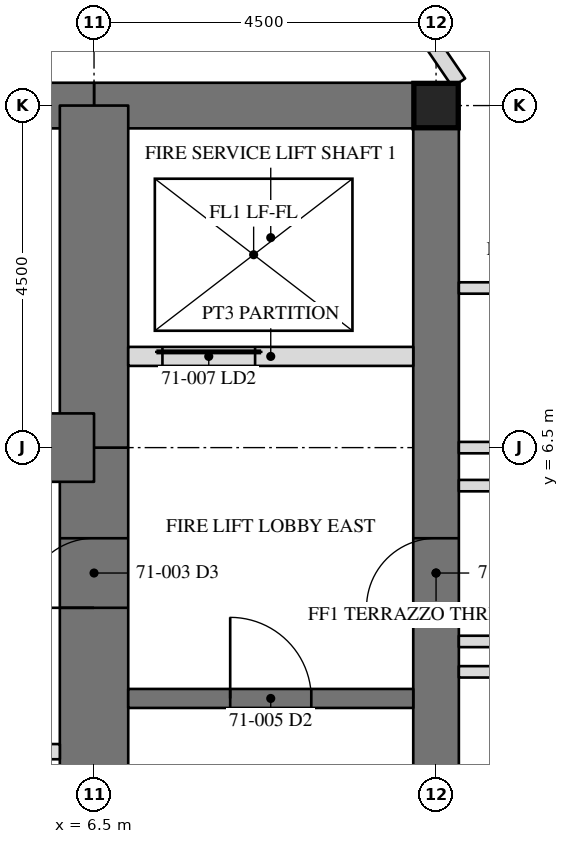
"""IFC4 building model, lengths in metres.
Left out: names, types, materials, properties, quantities, classifications, styles, units other than length and angle.
Written with IfcOpenShell. Run it as: python <this file> out.ifc"""

import sys

from ifc_helpers import new_model, si_unit, direction, frame, frame_2d, origin, origin_2d, place, context, subcontext, project, spatial, rectangle, hollow_rectangle, extrude, element, fill, save


model = new_model("IFC4")
c1 = context("Model", 3, precision=1e-05, world=origin(), true_north=direction((0.0, 1.0)))
c2 = subcontext(c1, "Body", "Model", "MODEL_VIEW")
j1 = project(units=[si_unit("LENGTHUNIT", "METRE"), si_unit("PLANEANGLEUNIT", "RADIAN")], contexts=[c1])
p1 = place(None, origin())
s1 = spatial("IfcSite", under=j1, at=p1, CompositionType="ELEMENT")
p2 = place(p1, origin())
s2 = spatial("IfcBuilding", under=s1, at=p2, CompositionType="ELEMENT")
p3 = place(p2, frame((0.0, 0.0, 288.4)))
s3 = spatial("IfcBuildingStorey", under=s2, at=p3, CompositionType="ELEMENT", Elevation=288.4)
p4 = place(p3, frame((11.0, -11.0, 0.0), z_axis=(0.0, 0.0, 1.0), x_axis=(0.0, 1.0, 0.0)))
e1 = element("IfcWall", 1, at=p4, inside=s3, PredefinedType="SHEAR", context=c2, shape_type="SweptSolid", body=[
    extrude(rectangle(XDim=22.0, YDim=0.6, at=frame_2d((11.0, 0.0))), origin(), (0.0, 0.0, 1.0), 3.6),
])
p5 = place(p4, frame((15.393, 0.0, 0.0)))
e2 = element("IfcOpeningElement", 2, at=p5, cuts=e1, PredefinedType="OPENING", context=c2, shape_type="SweptSolid", body=[
    extrude(rectangle(XDim=0.915, YDim=2.134, at=frame_2d((0.458, 1.067))), frame((0.0, 0.31, 0.0), z_axis=(0.0, -1.0, 0.0), x_axis=(1.0, 0.0, 0.0)), (0.0, 0.0, 1.0), 0.62),
])
p6 = place(p3, frame((11.0, 11.0, 0.0), z_axis=(0.0, 0.0, 1.0), x_axis=(-1.0, 0.0, 0.0)))
e3 = element("IfcWall", 3, at=p6, inside=s3, PredefinedType="SHEAR", context=c2, shape_type="SweptSolid", body=[
    extrude(rectangle(XDim=4.5, YDim=0.6, at=frame_2d((2.25, 0.0))), origin(), (0.0, 0.0, 1.0), 3.6),
])
p7 = place(p3, frame((6.5, 11.0, 0.0), z_axis=(0.0, 0.0, 1.0), x_axis=(-1.0, 0.0, 0.0)))
e4 = element("IfcWall", 4, at=p7, inside=s3, PredefinedType="SHEAR", context=c2, shape_type="SweptSolid", body=[
    extrude(rectangle(XDim=13.0, YDim=0.6, at=frame_2d((6.5, 0.0))), origin(), (0.0, 0.0, 1.0), 3.6),
])
p8 = place(p7, frame((6.0, 0.0, 0.0)))
e5 = element("IfcOpeningElement", 5, at=p8, cuts=e4, PredefinedType="OPENING", context=c2, shape_type="SweptSolid", body=[
    extrude(rectangle(XDim=1.0, YDim=2.134, at=frame_2d((0.5, 1.067))), frame((0.0, 0.31, 0.0), z_axis=(0.0, -1.0, 0.0), x_axis=(1.0, 0.0, 0.0)), (0.0, 0.0, 1.0), 0.62),
])
p9 = place(p3, frame((6.5, -6.5, 0.0), z_axis=(0.0, 0.0, 1.0), x_axis=(0.0, 1.0, 0.0)))
e6 = element("IfcWall", 6, at=p9, inside=s3, PredefinedType="SHEAR", context=c2, shape_type="SweptSolid", body=[
    extrude(rectangle(XDim=13.0, YDim=0.9, at=frame_2d((6.5, 0.0))), origin(), (0.0, 0.0, 1.0), 3.6),
])
p10 = place(p9, frame((10.893, 0.0, 0.0)))
e7 = element("IfcOpeningElement", 7, at=p10, cuts=e6, PredefinedType="OPENING", context=c2, shape_type="SweptSolid", body=[
    extrude(rectangle(XDim=0.915, YDim=2.134, at=frame_2d((0.458, 1.067))), frame((0.0, 0.46, 0.0), z_axis=(0.0, -1.0, 0.0), x_axis=(1.0, 0.0, 0.0)), (0.0, 0.0, 1.0), 0.92),
])
p11 = place(p9, frame((0.61, 0.0, 0.0)))
e8 = element("IfcOpeningElement", 8, at=p11, cuts=e6, PredefinedType="OPENING", context=c2, shape_type="SweptSolid", body=[
    extrude(rectangle(XDim=0.915, YDim=2.134, at=frame_2d((0.458, 1.067))), frame((0.0, 0.46, 0.0), z_axis=(0.0, -1.0, 0.0), x_axis=(1.0, 0.0, 0.0)), (0.0, 0.0, 1.0), 0.92),
])
p12 = place(p3, frame((6.5, 6.5, 0.0), z_axis=(0.0, 0.0, 1.0), x_axis=(0.0, 1.0, 0.0)))
e9 = element("IfcWall", 9, at=p12, inside=s3, PredefinedType="SHEAR", context=c2, shape_type="SweptSolid", body=[
    extrude(rectangle(XDim=4.5, YDim=0.9, at=frame_2d((2.25, 0.0))), origin(), (0.0, 0.0, 1.0), 3.6),
])
p13 = place(p3, frame((6.5, 6.5, 0.0), z_axis=(0.0, 0.0, 1.0), x_axis=(-1.0, 0.0, 0.0)))
e10 = element("IfcWall", 10, at=p13, inside=s3, PredefinedType="SHEAR", context=c2, shape_type="SweptSolid", body=[
    extrude(rectangle(XDim=13.0, YDim=0.9, at=frame_2d((6.5, 0.0))), origin(), (0.0, 0.0, 1.0), 3.6),
])
p14 = place(p13, frame((6.042, 0.0, 0.0)))
e11 = element("IfcOpeningElement", 11, at=p14, cuts=e10, PredefinedType="OPENING", context=c2, shape_type="SweptSolid", body=[
    extrude(rectangle(XDim=0.915, YDim=2.134, at=frame_2d((0.458, 1.067))), frame((0.0, 0.46, 0.0), z_axis=(0.0, -1.0, 0.0), x_axis=(1.0, 0.0, 0.0)), (0.0, 0.0, 1.0), 0.92),
])
p15 = place(p13, frame((10.066, 0.0, 0.0)))
e12 = element("IfcOpeningElement", 12, at=p15, cuts=e10, PredefinedType="OPENING", context=c2, shape_type="SweptSolid", body=[
    extrude(rectangle(XDim=1.118, YDim=2.134, at=frame_2d((0.559, 1.067))), frame((0.0, 0.46, 0.0), z_axis=(0.0, -1.0, 0.0), x_axis=(1.0, 0.0, 0.0)), (0.0, 0.0, 1.0), 0.92),
])
p16 = place(p13, frame((2.518, 0.0, 0.0)))
e13 = element("IfcOpeningElement", 13, at=p16, cuts=e10, PredefinedType="OPENING", context=c2, shape_type="SweptSolid", body=[
    extrude(rectangle(XDim=0.915, YDim=2.134, at=frame_2d((0.458, 1.067))), frame((0.0, 0.46, 0.0), z_axis=(0.0, -1.0, 0.0), x_axis=(1.0, 0.0, 0.0)), (0.0, 0.0, 1.0), 0.92),
])
p17 = place(p3, frame((11.0, 11.0, 0.0), z_axis=(0.0, 0.0, 1.0), x_axis=(1.0, 0.0, 0.0)))
e14 = element("IfcColumn", 14, at=p17, inside=s3, PredefinedType="COLUMN", context=c2, shape_type="SweptSolid", body=[
    extrude(hollow_rectangle(XDim=0.584, YDim=0.584, WallThickness=0.051, at=origin_2d()), origin(), (0.0, 0.0, 1.0), 3.6),
])
p18 = place(p3, frame((6.95, 3.2, 0.0), z_axis=(0.0, 0.0, 1.0), x_axis=(1.0, 0.0, 0.0)))
e15 = element("IfcWall", 15, at=p18, inside=s3, PredefinedType="SOLIDWALL", context=c2, shape_type="SweptSolid", body=[
    extrude(rectangle(XDim=3.75, YDim=0.25, at=frame_2d((1.875, 0.0))), origin(), (0.0, 0.0, 1.0), 3.41),
])
p19 = place(p18, frame((1.342, 0.0, 0.0)))
e16 = element("IfcOpeningElement", 16, at=p19, cuts=e15, PredefinedType="OPENING", context=c2, shape_type="SweptSolid", body=[
    extrude(rectangle(XDim=1.067, YDim=2.134, at=frame_2d((0.533, 1.067))), frame((0.0, 0.135, 0.0), z_axis=(0.0, -1.0, 0.0), x_axis=(1.0, 0.0, 0.0)), (0.0, 0.0, 1.0), 0.27),
])
p20 = place(p3, frame((6.95, 7.7, 0.0), z_axis=(0.0, 0.0, 1.0), x_axis=(1.0, 0.0, 0.0)))
e17 = element("IfcWall", 17, at=p20, inside=s3, PredefinedType="PARTITIONING", context=c2, shape_type="SweptSolid", body=[
    extrude(rectangle(XDim=3.75, YDim=0.25, at=frame_2d((1.875, 0.0))), origin(), (0.0, 0.0, 1.0), 3.41),
])
p21 = place(p20, frame((0.45, 0.0, 0.0)))
e18 = element("IfcOpeningElement", 18, at=p21, cuts=e17, PredefinedType="OPENING", context=c2, shape_type="SweptSolid", body=[
    extrude(rectangle(XDim=1.219, YDim=2.134, at=frame_2d((0.609, 1.067))), frame((0.0, 0.135, 0.0), z_axis=(0.0, -1.0, 0.0), x_axis=(1.0, 0.0, 0.0)), (0.0, 0.0, 1.0), 0.27),
])
p22 = place(p3, frame((-6.05, 2.5, 0.0), z_axis=(0.0, 0.0, 1.0), x_axis=(1.0, 0.0, 0.0)))
e19 = element("IfcWall", 19, at=p22, inside=s3, PredefinedType="PARTITIONING", context=c2, shape_type="SweptSolid", body=[
    extrude(rectangle(XDim=12.1, YDim=0.2, at=frame_2d((6.05, 0.0))), origin(), (0.0, 0.0, 1.0), 3.41),
])
p23 = place(p22, frame((1.408, 0.0, 0.0)))
e20 = element("IfcOpeningElement", 20, at=p23, cuts=e19, PredefinedType="OPENING", context=c2, shape_type="SweptSolid", body=[
    extrude(rectangle(XDim=1.067, YDim=2.134, at=frame_2d((0.533, 1.067))), frame((0.0, 0.11, 0.0), z_axis=(0.0, -1.0, 0.0), x_axis=(1.0, 0.0, 0.0)), (0.0, 0.0, 1.0), 0.22),
])
p24 = place(p22, frame((5.517, 0.0, 0.0)))
e21 = element("IfcOpeningElement", 21, at=p24, cuts=e19, PredefinedType="OPENING", context=c2, shape_type="SweptSolid", body=[
    extrude(rectangle(XDim=1.067, YDim=2.134, at=frame_2d((0.533, 1.067))), frame((0.0, 0.11, 0.0), z_axis=(0.0, -1.0, 0.0), x_axis=(1.0, 0.0, 0.0)), (0.0, 0.0, 1.0), 0.22),
])
p25 = place(p22, frame((9.625, 0.0, 0.0)))
e22 = element("IfcOpeningElement", 22, at=p25, cuts=e19, PredefinedType="OPENING", context=c2, shape_type="SweptSolid", body=[
    extrude(rectangle(XDim=1.067, YDim=2.134, at=frame_2d((0.533, 1.067))), frame((0.0, 0.11, 0.0), z_axis=(0.0, -1.0, 0.0), x_axis=(1.0, 0.0, 0.0)), (0.0, 0.0, 1.0), 0.22),
])
p26 = place(p3, frame((11.3, 11.3, 0.0), z_axis=(0.0, 0.0, 1.0), x_axis=(-0.563469639691, 0.826136771453, 0.0)))
e23 = element("IfcWall", 23, at=p26, inside=s3, PredefinedType="PARTITIONING", context=c2, shape_type="SweptSolid", body=[
    extrude(rectangle(XDim=3.137, YDim=0.2, at=frame_2d((1.568, 0.0))), origin(), (0.0, 0.0, 1.0), 2.704),
])
p27 = place(p3, frame((11.3, 6.5, 0.0), z_axis=(0.0, 0.0, 1.0), x_axis=(1.0, 0.0, 0.0)))
e24 = element("IfcWall", 24, at=p27, inside=s3, PredefinedType="PARTITIONING", context=c2, shape_type="SweptSolid", body=[
    extrude(rectangle(XDim=5.615, YDim=0.15, at=frame_2d((2.808, 0.0))), origin(), (0.0, 0.0, 1.0), 2.966),
])
p28 = place(p27, frame((2.742, 0.0, 0.0)))
e25 = element("IfcOpeningElement", 25, at=p28, cuts=e24, PredefinedType="OPENING", context=c2, shape_type="SweptSolid", body=[
    extrude(rectangle(XDim=0.915, YDim=2.134, at=frame_2d((0.458, 1.067))), frame((0.0, 0.085, 0.0), z_axis=(0.0, -1.0, 0.0), x_axis=(1.0, 0.0, 0.0)), (0.0, 0.0, 1.0), 0.17),
])
for number, where, z_axis, x_axis in (
    (26, (11.3, 3.95, 0.0), (0.0, 0.0, 1.0), (1.0, 0.0, 0.0)),
    (27, (11.3, 6.0, 0.0), (0.0, 0.0, 1.0), (1.0, 0.0, 0.0)),
):
    element("IfcWall", number, at=place(p3, frame(where, z_axis=z_axis, x_axis=x_axis)), inside=s3, PredefinedType="PARTITIONING", context=c2, shape_type="SweptSolid", body=[
        extrude(rectangle(XDim=1.525, YDim=0.15, at=frame_2d((0.762, 0.0))), origin(), (0.0, 0.0, 1.0), 3.41),
    ])
p29 = place(p3, frame((11.3, 3.55, 0.0), z_axis=(0.0, 0.0, 1.0), x_axis=(1.0, 0.0, 0.0)))
e28 = element("IfcWall", 28, at=p29, inside=s3, PredefinedType="PARTITIONING", context=c2, shape_type="SweptSolid", body=[
    extrude(rectangle(XDim=2.725, YDim=0.15, at=frame_2d((1.362, 0.0))), origin(), (0.0, 0.0, 1.0), 3.41),
])
p30 = place(p3, frame((11.3, 8.6, 0.0), z_axis=(0.0, 0.0, 1.0), x_axis=(1.0, 0.0, 0.0)))
e29 = element("IfcWall", 29, at=p30, inside=s3, PredefinedType="PARTITIONING", context=c2, shape_type="SweptSolid", body=[
    extrude(rectangle(XDim=1.925, YDim=0.15, at=frame_2d((0.962, 0.0))), origin(), (0.0, 0.0, 1.0), 3.41),
])
p31 = place(p5, origin())
e30 = element("IfcDoor", 30, at=p31, inside=s3, OperationType="SINGLE_SWING_RIGHT", PredefinedType="DOOR", context=c2, shape_type="SweptSolid", body=[
    extrude(rectangle(XDim=0.915, YDim=2.134, at=frame_2d((0.458, 1.067))), frame((0.0, -0.225, 0.0), z_axis=(0.0, -1.0, 0.0), x_axis=(1.0, 0.0, 0.0)), (0.0, 0.0, 1.0), 0.05),
])
fill(e2, e30)
p32 = place(p10, origin())
e31 = element("IfcDoor", 31, at=p32, inside=s3, OperationType="SINGLE_SWING_RIGHT", PredefinedType="DOOR", context=c2, shape_type="SweptSolid", body=[
    extrude(rectangle(XDim=0.915, YDim=2.134, at=frame_2d((0.458, 1.067))), frame((0.0, -0.375, 0.0), z_axis=(0.0, -1.0, 0.0), x_axis=(1.0, 0.0, 0.0)), (0.0, 0.0, 1.0), 0.05),
])
fill(e7, e31)
p33 = place(p19, origin())
e32 = element("IfcDoor", 32, at=p33, inside=s3, OperationType="SINGLE_SWING_LEFT", PredefinedType="DOOR", context=c2, shape_type="SweptSolid", body=[
    extrude(rectangle(XDim=1.067, YDim=2.134, at=frame_2d((0.533, 1.067))), frame((0.0, 0.025, 0.0), z_axis=(0.0, -1.0, 0.0), x_axis=(1.0, 0.0, 0.0)), (0.0, 0.0, 1.0), 0.05),
])
fill(e16, e32)
p34 = place(p21, origin())
e33 = element("IfcDoor", 33, at=p34, inside=s3, OperationType="SLIDING_TO_LEFT", PredefinedType="DOOR", context=c2, shape_type="SweptSolid", body=[
    extrude(rectangle(XDim=1.219, YDim=2.134, at=frame_2d((0.609, 1.067))), frame((0.0, 0.025, 0.0), z_axis=(0.0, -1.0, 0.0), x_axis=(1.0, 0.0, 0.0)), (0.0, 0.0, 1.0), 0.05),
])
fill(e18, e33)
save(model, sys.argv[1])
